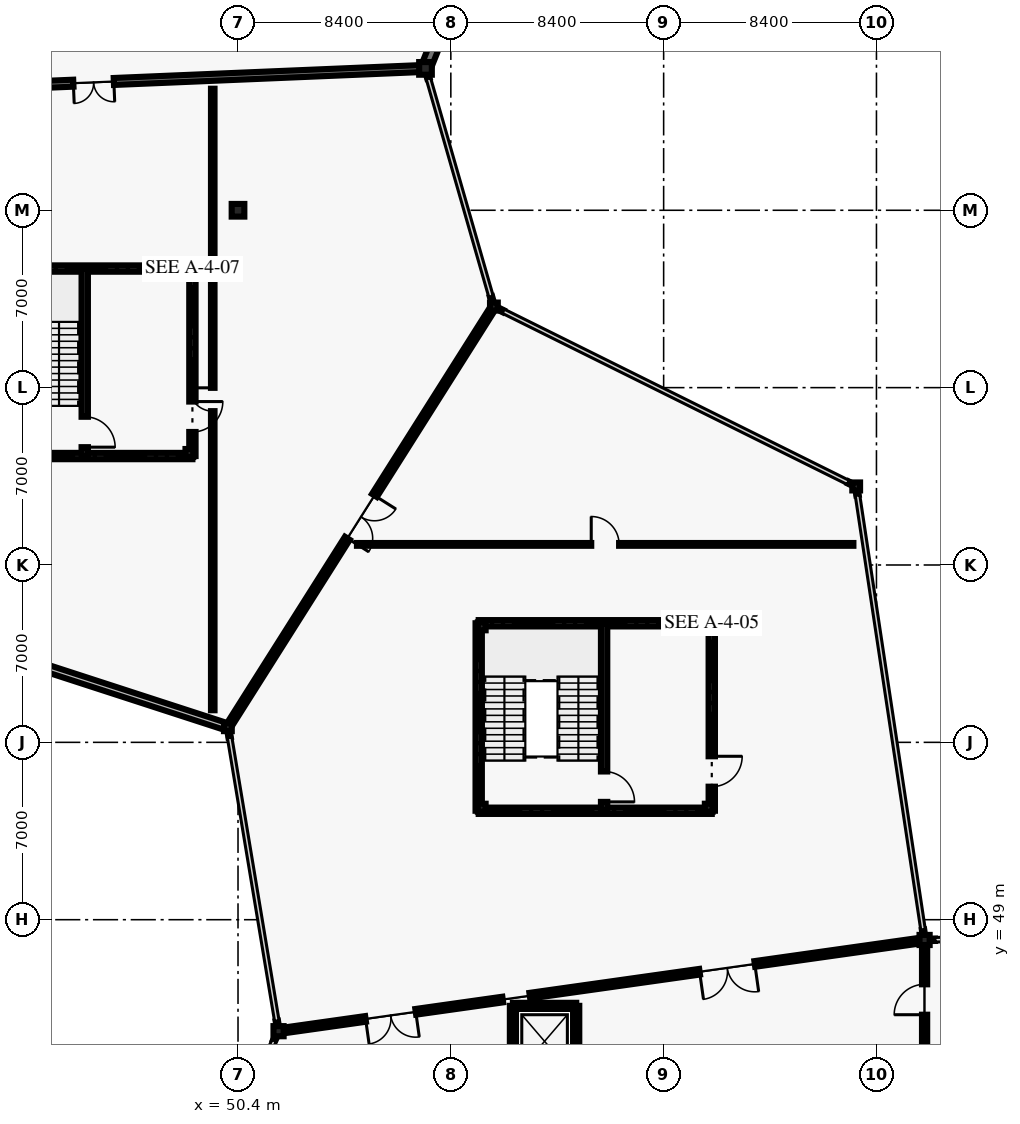
"""IFC4 building model, lengths in metres.
Left out: names, types, materials, properties, quantities, classifications, styles, units other than length and angle.
Written with IfcOpenShell. Run it as: python <this file> out.ifc"""

import sys

from ifc_helpers import new_model, si_unit, direction, frame, frame_2d, origin, origin_2d, place, context, subcontext, project, spatial, rectangle, i_section, extrude, element, fill, save


model = new_model("IFC4")
c1 = context("Model", 3, precision=1e-05, world=origin(), true_north=direction((0.0, 1.0)))
c2 = subcontext(c1, "Body", "Model", "MODEL_VIEW")
j1 = project(units=[si_unit("LENGTHUNIT", "METRE"), si_unit("PLANEANGLEUNIT", "RADIAN")], contexts=[c1])
p1 = place(None, origin())
s1 = spatial("IfcSite", under=j1, at=p1, CompositionType="ELEMENT")
p2 = place(p1, origin())
s2 = spatial("IfcBuilding", under=s1, at=p2, CompositionType="ELEMENT")
p3 = place(p2, frame((0.0, 0.0, 5.4)))
s3 = spatial("IfcBuildingStorey", under=s2, at=p3, CompositionType="ELEMENT", Elevation=5.4)
p4 = place(p3, frame((50.0, 56.6, 0.0), z_axis=(0.0, 0.0, 1.0), x_axis=(1.0, 0.0, 0.0)))
e1 = element("IfcColumn", 1, at=p4, inside=s3, PredefinedType="COLUMN", context=c2, shape_type="SweptSolid", body=[
    extrude(i_section(OverallWidth=0.307, OverallDepth=0.315, WebThickness=0.012, FlangeThickness=0.019, FilletRadius=0.017, at=origin_2d()), origin(), (0.0, 0.0, 1.0), 4.8),
])
p5 = place(p3, frame((52.0, 44.6, 0.0), z_axis=(0.0, 0.0, 1.0), x_axis=(1.0, 0.0, 0.0)))
e2 = element("IfcColumn", 2, at=p5, inside=s3, PredefinedType="COLUMN", context=c2, shape_type="SweptSolid", body=[
    extrude(i_section(OverallWidth=0.4, OverallDepth=0.4, WebThickness=0.022, FlangeThickness=0.036, at=origin_2d()), origin(), (0.0, 0.0, 1.0), 4.8),
])
p6 = place(p3, frame((57.8, 82.6, 0.0), z_axis=(0.0, 0.0, 1.0), x_axis=(1.0, 0.0, 0.0)))
e3 = element("IfcColumn", 3, at=p6, inside=s3, PredefinedType="COLUMN", context=c2, shape_type="SweptSolid", body=[
    extrude(rectangle(XDim=0.5, YDim=0.5, at=origin_2d()), origin(), (0.0, 0.0, 1.0), 4.8),
])
for number, where, z_axis, x_axis in (
    (4, (60.5, 73.2, 0.0), (0.0, 0.0, 1.0), (1.0, 0.0, 0.0)),
    (5, (74.8, 66.1, 0.0), (0.0, 0.0, 1.0), (1.0, 0.0, 0.0)),
):
    element("IfcColumn", number, at=place(p3, frame(where, z_axis=z_axis, x_axis=x_axis)), inside=s3, PredefinedType="COLUMN", context=c2, shape_type="SweptSolid", body=[
        extrude(i_section(OverallWidth=0.307, OverallDepth=0.315, WebThickness=0.012, FlangeThickness=0.019, FilletRadius=0.017, at=origin_2d()), origin(), (0.0, 0.0, 1.0), 4.8),
    ])
p7 = place(p3, frame((77.5, 48.2, 0.0), z_axis=(0.0, 0.0, 1.0), x_axis=(1.0, 0.0, 0.0)))
e6 = element("IfcColumn", 6, at=p7, inside=s3, PredefinedType="COLUMN", context=c2, shape_type="SweptSolid", body=[
    extrude(i_section(OverallWidth=0.4, OverallDepth=0.4, WebThickness=0.022, FlangeThickness=0.036, at=origin_2d()), origin(), (0.0, 0.0, 1.0), 4.8),
])
p8 = place(p3, frame((50.4, 77.0, 0.0), z_axis=(0.0, 0.0, 1.0), x_axis=(1.0, 0.0, 0.0)))
e7 = element("IfcColumn", 7, at=p8, inside=s3, PredefinedType="COLUMN", context=c2, shape_type="SweptSolid", body=[
    extrude(rectangle(XDim=0.5, YDim=0.5, at=origin_2d()), origin(), (0.0, 0.0, 1.0), 4.8),
])
for number, where, z_axis, x_axis in (
    (8, (60.02, 53.42, 0.0), (0.0, 0.0, 1.0), (1.0, 0.0, 0.0)),
    (9, (68.98, 53.42, 0.0), (0.0, 0.0, 1.0), (1.0, 0.0, 0.0)),
    (10, (68.98, 60.58, 0.0), (0.0, 0.0, 1.0), (1.0, 0.0, 0.0)),
    (11, (60.02, 60.58, 0.0), (0.0, 0.0, 1.0), (1.0, 0.0, 0.0)),
    (12, (48.48, 67.42, 0.0), (0.0, 0.0, 1.0), (1.0, 0.0, 0.0)),
    (13, (48.48, 74.58, 0.0), (0.0, 0.0, 1.0), (1.0, 0.0, 0.0)),
):
    element("IfcColumn", number, at=place(p3, frame(where, z_axis=z_axis, x_axis=x_axis)), inside=s3, PredefinedType="COLUMN", context=c2, shape_type="SweptSolid", body=[
        extrude(i_section(OverallWidth=0.307, OverallDepth=0.315, WebThickness=0.012, FlangeThickness=0.019, FilletRadius=0.017, at=origin_2d()), origin(), (0.0, 0.0, 1.0), 4.8),
    ])
p9 = place(p3, frame((51.825, 44.229, 0.0), z_axis=(0.0, 0.0, 1.0), x_axis=(0.425224932958, 0.905087706463, 0.0)))
e14 = element("IfcWall", 14, at=p9, inside=s3, PredefinedType="SOLIDWALL", context=c2, shape_type="SweptSolid", body=[
    extrude(rectangle(XDim=0.308, YDim=0.095, at=frame_2d((0.154, 0.0))), origin(), (0.0, 0.0, 1.0), 3.62),
])
p10 = place(p3, frame((77.602, 48.202, 0.0), z_axis=(0.0, 0.0, 1.0), x_axis=(0.999735659566, 0.022991541735, 0.0)))
e15 = element("IfcWall", 15, at=p10, inside=s3, PredefinedType="SOLIDWALL", context=c2, shape_type="SweptSolid", body=[
    extrude(rectangle(XDim=0.308, YDim=0.095, at=frame_2d((0.154, 0.0))), origin(), (0.0, 0.0, 1.0), 3.62),
])
for number, where, z_axis, x_axis in (
    (16, (51.983, 44.7, 0.0), (0.0, 0.0, 1.0), (-0.166, 0.986, 0.0)),
    (17, (50.068, 56.196, 0.0), (0.0, 0.0, 1.0), (-0.166, 0.986, 0.0)),
):
    element("IfcWall", number, at=place(p3, frame(where, z_axis=z_axis, x_axis=x_axis)), inside=s3, PredefinedType="SOLIDWALL", context=c2, shape_type="SweptSolid", body=[
        extrude(rectangle(XDim=0.308, YDim=0.095, at=frame_2d((0.154, 0.0))), origin(), (0.0, 0.0, 1.0), 3.62),
    ])
p11 = place(p3, frame((74.806, 66.058, 0.0), z_axis=(0.0, 0.0, 1.0), x_axis=(0.14996991646, -0.988690560366, 0.0)))
e18 = element("IfcWall", 18, at=p11, inside=s3, PredefinedType="SOLIDWALL", context=c2, shape_type="SweptSolid", body=[
    extrude(rectangle(XDim=0.308, YDim=0.095, at=frame_2d((0.154, 0.0))), origin(), (0.0, 0.0, 1.0), 3.62),
])
p12 = place(p3, frame((77.439, 48.605, 0.0), z_axis=(0.0, 0.0, 1.0), x_axis=(0.15008766182, -0.988672692942, 0.0)))
e19 = element("IfcWall", 19, at=p12, inside=s3, PredefinedType="SOLIDWALL", context=c2, shape_type="SweptSolid", body=[
    extrude(rectangle(XDim=0.307, YDim=0.095, at=frame_2d((0.154, 0.0))), origin(), (0.0, 0.0, 1.0), 3.62),
])
for number, where, z_axis, x_axis in (
    (20, (60.592, 73.154, 0.0), (0.0, 0.0, 1.0), (0.895, -0.446, 0.0)),
    (21, (74.487, 66.256, 0.0), (0.0, 0.0, 1.0), (0.895, -0.447, 0.0)),
):
    element("IfcWall", number, at=place(p3, frame(where, z_axis=z_axis, x_axis=x_axis)), inside=s3, PredefinedType="SOLIDWALL", context=c2, shape_type="SweptSolid", body=[
        extrude(rectangle(XDim=0.307, YDim=0.095, at=frame_2d((0.154, 0.0))), origin(), (0.0, 0.0, 1.0), 3.62),
    ])
for number, where, z_axis, x_axis in (
    (22, (57.829, 82.502, 0.0), (0.0, 0.0, 1.0), (0.276, -0.961, 0.0)),
    (23, (60.386, 73.594, 0.0), (0.0, 0.0, 1.0), (0.276, -0.961, 0.0)),
):
    element("IfcWall", number, at=place(p3, frame(where, z_axis=z_axis, x_axis=x_axis)), inside=s3, PredefinedType="SOLIDWALL", context=c2, shape_type="SweptSolid", body=[
        extrude(rectangle(XDim=0.308, YDim=0.095, at=frame_2d((0.154, 0.0))), origin(), (0.0, 0.0, 1.0), 3.62),
    ])
p13 = place(p3, frame((49.943, 56.619, 0.0), z_axis=(0.0, 0.0, 1.0), x_axis=(-0.951074357174, 0.308962080402, 0.0)))
e24 = element("IfcWall", 24, at=p13, inside=s3, PredefinedType="SOLIDWALL", context=c2, shape_type="SweptSolid", body=[
    extrude(rectangle(XDim=24.8, YDim=0.29, at=frame_2d((12.4, 0.0))), origin(), (0.0, 0.0, 1.0), 3.62),
])
p14 = place(p13, frame((11.3, 0.0, 0.95)))
e25 = element("IfcOpeningElement", 25, at=p14, cuts=e24, PredefinedType="OPENING", context=c2, shape_type="SweptSolid", body=[
    extrude(rectangle(XDim=2.2, YDim=2.1, at=frame_2d((1.1, 1.05))), frame((0.0, 0.155, 0.0), z_axis=(0.0, -1.0, 0.0), x_axis=(1.0, 0.0, 0.0)), (0.0, 0.0, 1.0), 0.31),
])
p15 = place(p3, frame((62.4, 94.1, 0.0), z_axis=(0.0, 0.0, 1.0), x_axis=(-0.371407751599, -0.928469860605, 0.0)))
e26 = element("IfcWall", 26, at=p15, inside=s3, PredefinedType="SOLIDWALL", context=c2, shape_type="SweptSolid", body=[
    extrude(rectangle(XDim=12.326, YDim=0.4, at=frame_2d((6.163, 0.0))), origin(), (0.0, 0.0, 1.0), 3.62),
])
p16 = place(p3, frame((77.5, 43.5, 0.0), z_axis=(0.0, 0.0, 1.0), x_axis=(0.0, 1.0, 0.0)))
e27 = element("IfcWall", 27, at=p16, inside=s3, PredefinedType="SOLIDWALL", context=c2, shape_type="SweptSolid", body=[
    extrude(rectangle(XDim=4.7, YDim=0.205, at=frame_2d((2.35, 0.0))), origin(), (0.0, 0.0, 1.0), 3.32),
])
p17 = place(p16, frame((1.75, 0.0, 0.0)))
e28 = element("IfcOpeningElement", 28, at=p17, cuts=e27, PredefinedType="OPENING", context=c2, shape_type="SweptSolid", body=[
    extrude(rectangle(XDim=1.2, YDim=2.2, at=frame_2d((0.6, 1.1))), frame((0.0, 0.113, 0.0), z_axis=(0.0, -1.0, 0.0), x_axis=(1.0, 0.0, 0.0)), (0.0, 0.0, 1.0), 0.225),
])
p18 = place(p3, frame((77.5, 48.2, 0.0), z_axis=(0.0, 0.0, 1.0), x_axis=(-0.990181159322, -0.139790098807, 0.0)))
e29 = element("IfcWall", 29, at=p18, inside=s3, PredefinedType="SOLIDWALL", context=c2, shape_type="SweptSolid", body=[
    extrude(rectangle(XDim=15.738, YDim=0.225, at=frame_2d((7.869, 0.0))), origin(), (0.0, 0.0, 1.0), 4.02),
])
p19 = place(p18, frame((6.769, 0.0, 0.0)))
e30 = element("IfcOpeningElement", 30, at=p19, cuts=e29, PredefinedType="OPENING", context=c2, shape_type="SweptSolid", body=[
    extrude(rectangle(XDim=2.2, YDim=2.6, at=frame_2d((1.1, 1.3))), frame((0.0, 0.123, 0.0), z_axis=(0.0, -1.0, 0.0), x_axis=(1.0, 0.0, 0.0)), (0.0, 0.0, 1.0), 0.245),
])
p20 = place(p3, frame((60.85, 45.849, 0.0), z_axis=(0.0, 0.0, 1.0), x_axis=(-0.990187360524, -0.139746166523, 0.0)))
e31 = element("IfcWall", 31, at=p20, inside=s3, PredefinedType="SOLIDWALL", context=c2, shape_type="SweptSolid", body=[
    extrude(rectangle(XDim=8.938, YDim=0.225, at=frame_2d((4.469, 0.0))), origin(), (0.0, 0.0, 1.0), 4.02),
])
p21 = place(p20, frame((3.469, 0.0, 0.0)))
e32 = element("IfcOpeningElement", 32, at=p21, cuts=e31, PredefinedType="OPENING", context=c2, shape_type="SweptSolid", body=[
    extrude(rectangle(XDim=2.0, YDim=2.5, at=frame_2d((1.0, 1.25))), frame((0.0, 0.123, 0.0), z_axis=(0.0, -1.0, 0.0), x_axis=(1.0, 0.0, 0.0)), (0.0, 0.0, 1.0), 0.245),
])
p22 = place(p3, frame((60.5, 73.2, 0.0), z_axis=(0.0, 0.0, 1.0), x_axis=(-0.534570878454, -0.845123645338, 0.0)))
e33 = element("IfcWall", 33, at=p22, inside=s3, PredefinedType="SOLIDWALL", context=c2, shape_type="SweptSolid", body=[
    extrude(rectangle(XDim=19.642, YDim=0.225, at=frame_2d((9.821, 0.0))), origin(), (0.0, 0.0, 1.0), 4.02),
])
p23 = place(p22, frame((8.821, 0.0, 0.0)))
e34 = element("IfcOpeningElement", 34, at=p23, cuts=e33, PredefinedType="OPENING", context=c2, shape_type="SweptSolid", body=[
    extrude(rectangle(XDim=2.0, YDim=2.5, at=frame_2d((1.0, 1.25))), frame((0.0, 0.123, 0.0), z_axis=(0.0, -1.0, 0.0), x_axis=(1.0, 0.0, 0.0)), (0.0, 0.0, 1.0), 0.245),
])
p24 = place(p3, frame((57.8, 82.6, 0.0), z_axis=(0.0, 0.0, 1.0), x_axis=(-0.999119645224, -0.041951573605, 0.0)))
e35 = element("IfcWall", 35, at=p24, inside=s3, PredefinedType="SOLIDWALL", context=c2, shape_type="SweptSolid", body=[
    extrude(rectangle(XDim=26.223, YDim=0.275, at=frame_2d((13.112, 0.0))), origin(), (0.0, 0.0, 1.0), 4.02),
])
p25 = place(p24, frame((12.312, 0.0, 0.0)))
e36 = element("IfcOpeningElement", 36, at=p25, cuts=e35, PredefinedType="OPENING", context=c2, shape_type="SweptSolid", body=[
    extrude(rectangle(XDim=1.6, YDim=2.45, at=frame_2d((0.8, 1.225))), frame((0.0, 0.147, 0.0), z_axis=(0.0, -1.0, 0.0), x_axis=(1.0, 0.0, 0.0)), (0.0, 0.0, 1.0), 0.295),
])
p26 = place(p3, frame((55.095, 63.813, 0.0), z_axis=(0.0, 0.0, 1.0), x_axis=(1.0, 0.0, 0.0)))
e37 = element("IfcWall", 37, at=p26, inside=s3, PredefinedType="PARTITIONING", context=c2, shape_type="SweptSolid", body=[
    extrude(rectangle(XDim=19.595, YDim=0.11, at=frame_2d((9.797, 0.0))), origin(), (0.0, 0.0, 1.0), 3.32),
])
p27 = place(p26, frame((9.247, 0.0, 0.0)))
e38 = element("IfcOpeningElement", 38, at=p27, cuts=e37, PredefinedType="OPENING", context=c2, shape_type="SweptSolid", body=[
    extrude(rectangle(XDim=1.1, YDim=2.2, at=frame_2d((0.55, 1.1))), frame((0.0, 0.065, 0.0), z_axis=(0.0, -1.0, 0.0), x_axis=(1.0, 0.0, 0.0)), (0.0, 0.0, 1.0), 0.13),
])
p28 = place(p3, frame((49.403, 57.267, 0.0), z_axis=(0.0, 0.0, 1.0), x_axis=(0.0, 1.0, 0.0)))
e39 = element("IfcWall", 39, at=p28, inside=s3, PredefinedType="PARTITIONING", context=c2, shape_type="SweptSolid", body=[
    extrude(rectangle(XDim=24.53, YDim=0.14, at=frame_2d((12.265, 0.0))), origin(), (0.0, 0.0, 1.0), 3.32),
])
p29 = place(p28, frame((11.805, 0.0, 0.0)))
e40 = element("IfcOpeningElement", 40, at=p29, cuts=e39, PredefinedType="OPENING", context=c2, shape_type="SweptSolid", body=[
    extrude(rectangle(XDim=0.92, YDim=2.1, at=frame_2d((0.46, 1.05))), frame((0.0, 0.08, 0.0), z_axis=(0.0, -1.0, 0.0), x_axis=(1.0, 0.0, 0.0)), (0.0, 0.0, 1.0), 0.16),
])
p30 = place(p3, frame((59.9, 53.3, 0.0), z_axis=(0.0, 0.0, 1.0), x_axis=(0.0, 1.0, 0.0)))
e41 = element("IfcWall", 41, at=p30, inside=s3, PredefinedType="SHEAR", context=c2, shape_type="SweptSolid", body=[
    extrude(rectangle(XDim=7.4, YDim=0.25, at=frame_2d((3.7, 0.0))), origin(), (0.0, 0.0, 1.0), 4.56),
])
for number, where, z_axis, x_axis in (
    (42, (59.9, 60.7, 0.0), (0.0, 0.0, 1.0), (1.0, 0.0, 0.0)),
    (43, (69.1, 53.3, 0.0), (0.0, 0.0, 1.0), (-1.0, 0.0, 0.0)),
):
    element("IfcWall", number, at=place(p3, frame(where, z_axis=z_axis, x_axis=x_axis)), inside=s3, PredefinedType="SHEAR", context=c2, shape_type="SweptSolid", body=[
        extrude(rectangle(XDim=9.2, YDim=0.25, at=frame_2d((4.6, 0.0))), origin(), (0.0, 0.0, 1.0), 4.56),
    ])
p31 = place(p3, frame((69.1, 60.7, 0.0), z_axis=(0.0, 0.0, 1.0), x_axis=(0.0, -1.0, 0.0)))
e44 = element("IfcWall", 44, at=p31, inside=s3, PredefinedType="SHEAR", context=c2, shape_type="SweptSolid", body=[
    extrude(rectangle(XDim=7.4, YDim=0.25, at=frame_2d((3.7, 0.0))), origin(), (0.0, 0.0, 1.0), 4.56),
])
p32 = place(p31, frame((5.25, 0.0, 0.0)))
e45 = element("IfcOpeningElement", 45, at=p32, cuts=e44, PredefinedType="OPENING", context=c2, shape_type="SweptSolid", body=[
    extrude(rectangle(XDim=1.2, YDim=2.2, at=frame_2d((0.6, 1.1))), frame((0.0, 0.135, 0.0), z_axis=(0.0, -1.0, 0.0), x_axis=(1.0, 0.0, 0.0)), (0.0, 0.0, 1.0), 0.27),
])
p33 = place(p3, frame((64.85, 60.7, 0.0), z_axis=(0.0, 0.0, 1.0), x_axis=(0.0, -1.0, 0.0)))
e46 = element("IfcWall", 46, at=p33, inside=s3, PredefinedType="SHEAR", context=c2, shape_type="SweptSolid", body=[
    extrude(rectangle(XDim=7.4, YDim=0.25, at=frame_2d((3.7, 0.0))), origin(), (0.0, 0.0, 1.0), 4.56),
])
p34 = place(p33, frame((5.85, 0.0, 0.0)))
e47 = element("IfcOpeningElement", 47, at=p34, cuts=e46, PredefinedType="OPENING", context=c2, shape_type="SweptSolid", body=[
    extrude(rectangle(XDim=1.2, YDim=2.2, at=frame_2d((0.6, 1.1))), frame((0.0, 0.135, 0.0), z_axis=(0.0, -1.0, 0.0), x_axis=(1.0, 0.0, 0.0)), (0.0, 0.0, 1.0), 0.27),
])
for number, where, z_axis, x_axis in (
    (48, (39.4, 74.7, 0.0), (0.0, 0.0, 1.0), (1.0, 0.0, 0.0)),
    (49, (48.6, 67.3, 0.0), (0.0, 0.0, 1.0), (-1.0, 0.0, 0.0)),
):
    element("IfcWall", number, at=place(p3, frame(where, z_axis=z_axis, x_axis=x_axis)), inside=s3, PredefinedType="SHEAR", context=c2, shape_type="SweptSolid", body=[
        extrude(rectangle(XDim=9.2, YDim=0.25, at=frame_2d((4.6, 0.0))), origin(), (0.0, 0.0, 1.0), 4.56),
    ])
p35 = place(p3, frame((48.6, 74.7, 0.0), z_axis=(0.0, 0.0, 1.0), x_axis=(0.0, -1.0, 0.0)))
e50 = element("IfcWall", 50, at=p35, inside=s3, PredefinedType="SHEAR", context=c2, shape_type="SweptSolid", body=[
    extrude(rectangle(XDim=7.4, YDim=0.25, at=frame_2d((3.7, 0.0))), origin(), (0.0, 0.0, 1.0), 4.56),
])
p36 = place(p35, frame((5.25, 0.0, 0.0)))
e51 = element("IfcOpeningElement", 51, at=p36, cuts=e50, PredefinedType="OPENING", context=c2, shape_type="SweptSolid", body=[
    extrude(rectangle(XDim=1.2, YDim=2.2, at=frame_2d((0.6, 1.1))), frame((0.0, 0.135, 0.0), z_axis=(0.0, -1.0, 0.0), x_axis=(1.0, 0.0, 0.0)), (0.0, 0.0, 1.0), 0.27),
])
p37 = place(p3, frame((44.35, 74.7, 0.0), z_axis=(0.0, 0.0, 1.0), x_axis=(0.0, -1.0, 0.0)))
e52 = element("IfcWall", 52, at=p37, inside=s3, PredefinedType="SHEAR", context=c2, shape_type="SweptSolid", body=[
    extrude(rectangle(XDim=7.4, YDim=0.25, at=frame_2d((3.7, 0.0))), origin(), (0.0, 0.0, 1.0), 4.56),
])
p38 = place(p37, frame((5.85, 0.0, 0.0)))
e53 = element("IfcOpeningElement", 53, at=p38, cuts=e52, PredefinedType="OPENING", context=c2, shape_type="SweptSolid", body=[
    extrude(rectangle(XDim=1.2, YDim=2.2, at=frame_2d((0.6, 1.1))), frame((0.0, 0.135, 0.0), z_axis=(0.0, -1.0, 0.0), x_axis=(1.0, 0.0, 0.0)), (0.0, 0.0, 1.0), 0.27),
])
p39 = place(p3, frame((61.25, 45.6, 0.0), z_axis=(0.0, 0.0, 1.0), x_axis=(1.0, 0.0, 0.0)))
e54 = element("IfcWall", 54, at=p39, inside=s3, PredefinedType="SHEAR", context=c2, shape_type="SweptSolid", body=[
    extrude(rectangle(XDim=2.5, YDim=0.24, at=frame_2d((1.25, 0.0))), origin(), (0.0, 0.0, 1.0), 4.56),
])
for number, where, z_axis, x_axis in (
    (55, (63.75, 45.6, 0.0), (0.0, 0.0, 1.0), (0.0, -1.0, 0.0)),
    (56, (61.25, 42.8, 0.0), (0.0, 0.0, 1.0), (0.0, 1.0, 0.0)),
):
    element("IfcWall", number, at=place(p3, frame(where, z_axis=z_axis, x_axis=x_axis)), inside=s3, PredefinedType="SHEAR", context=c2, shape_type="SweptSolid", body=[
        extrude(rectangle(XDim=2.8, YDim=0.24, at=frame_2d((1.4, 0.0))), origin(), (0.0, 0.0, 1.0), 4.56),
    ])
p40 = place(p17, origin())
e57 = element("IfcDoor", 57, at=p40, inside=s3, OperationType="SINGLE_SWING_LEFT", PredefinedType="DOOR", context=c2, shape_type="SweptSolid", body=[
    extrude(rectangle(XDim=1.2, YDim=2.2, at=frame_2d((0.6, 1.1))), frame((0.0, 0.025, 0.0), z_axis=(0.0, -1.0, 0.0), x_axis=(1.0, 0.0, 0.0)), (0.0, 0.0, 1.0), 0.05),
])
fill(e28, e57)
p41 = place(p19, origin())
e58 = element("IfcDoor", 58, at=p41, inside=s3, OperationType="DOUBLE_DOOR_SINGLE_SWING", PredefinedType="DOOR", context=c2, shape_type="SweptSolid", body=[
    extrude(rectangle(XDim=2.2, YDim=2.6, at=frame_2d((1.1, 1.3))), frame((0.0, 0.025, 0.0), z_axis=(0.0, -1.0, 0.0), x_axis=(1.0, 0.0, 0.0)), (0.0, 0.0, 1.0), 0.05),
])
fill(e30, e58)
p42 = place(p21, origin())
e59 = element("IfcDoor", 59, at=p42, inside=s3, OperationType="DOUBLE_DOOR_SINGLE_SWING", PredefinedType="DOOR", context=c2, shape_type="SweptSolid", body=[
    extrude(rectangle(XDim=2.0, YDim=2.5, at=frame_2d((1.0, 1.25))), frame((0.0, 0.025, 0.0), z_axis=(0.0, -1.0, 0.0), x_axis=(1.0, 0.0, 0.0)), (0.0, 0.0, 1.0), 0.05),
])
fill(e32, e59)
p43 = place(p23, origin())
e60 = element("IfcDoor", 60, at=p43, inside=s3, OperationType="DOUBLE_DOOR_SINGLE_SWING", PredefinedType="DOOR", context=c2, shape_type="SweptSolid", body=[
    extrude(rectangle(XDim=2.0, YDim=2.5, at=frame_2d((1.0, 1.25))), frame((0.0, 0.025, 0.0), z_axis=(0.0, -1.0, 0.0), x_axis=(1.0, 0.0, 0.0)), (0.0, 0.0, 1.0), 0.05),
])
fill(e34, e60)
p44 = place(p25, origin())
e61 = element("IfcDoor", 61, at=p44, inside=s3, OperationType="DOUBLE_DOOR_SINGLE_SWING", PredefinedType="DOOR", context=c2, shape_type="SweptSolid", body=[
    extrude(rectangle(XDim=1.6, YDim=2.45, at=frame_2d((0.8, 1.225))), frame((0.0, 0.025, 0.0), z_axis=(0.0, -1.0, 0.0), x_axis=(1.0, 0.0, 0.0)), (0.0, 0.0, 1.0), 0.05),
])
fill(e36, e61)
p45 = place(p27, origin())
e62 = element("IfcDoor", 62, at=p45, inside=s3, OperationType="SINGLE_SWING_LEFT", PredefinedType="DOOR", context=c2, shape_type="SweptSolid", body=[
    extrude(rectangle(XDim=1.1, YDim=2.2, at=frame_2d((0.55, 1.1))), frame((0.0, 0.025, 0.0), z_axis=(0.0, -1.0, 0.0), x_axis=(1.0, 0.0, 0.0)), (0.0, 0.0, 1.0), 0.05),
])
fill(e38, e62)
p46 = place(p29, origin())
e63 = element("IfcDoor", 63, at=p46, inside=s3, OperationType="SINGLE_SWING_RIGHT", PredefinedType="DOOR", context=c2, shape_type="SweptSolid", body=[
    extrude(rectangle(XDim=0.92, YDim=2.1, at=frame_2d((0.46, 1.05))), frame((0.0, 0.025, 0.0), z_axis=(0.0, -1.0, 0.0), x_axis=(1.0, 0.0, 0.0)), (0.0, 0.0, 1.0), 0.05),
])
fill(e40, e63)
p47 = place(p32, origin())
e64 = element("IfcDoor", 64, at=p47, inside=s3, OperationType="SINGLE_SWING_LEFT", PredefinedType="DOOR", context=c2, shape_type="SweptSolid", body=[
    extrude(rectangle(XDim=1.2, YDim=2.2, at=frame_2d((0.6, 1.1))), frame((0.0, 0.025, 0.0), z_axis=(0.0, -1.0, 0.0), x_axis=(1.0, 0.0, 0.0)), (0.0, 0.0, 1.0), 0.05),
])
fill(e45, e64)
p48 = place(p34, origin())
e65 = element("IfcDoor", 65, at=p48, inside=s3, OperationType="SINGLE_SWING_RIGHT", PredefinedType="DOOR", context=c2, shape_type="SweptSolid", body=[
    extrude(rectangle(XDim=1.2, YDim=2.2, at=frame_2d((0.6, 1.1))), frame((0.0, 0.025, 0.0), z_axis=(0.0, -1.0, 0.0), x_axis=(1.0, 0.0, 0.0)), (0.0, 0.0, 1.0), 0.05),
])
fill(e47, e65)
p49 = place(p36, origin())
e66 = element("IfcDoor", 66, at=p49, inside=s3, OperationType="SINGLE_SWING_LEFT", PredefinedType="DOOR", context=c2, shape_type="SweptSolid", body=[
    extrude(rectangle(XDim=1.2, YDim=2.2, at=frame_2d((0.6, 1.1))), frame((0.0, 0.025, 0.0), z_axis=(0.0, -1.0, 0.0), x_axis=(1.0, 0.0, 0.0)), (0.0, 0.0, 1.0), 0.05),
])
fill(e51, e66)
p50 = place(p38, origin())
e67 = element("IfcDoor", 67, at=p50, inside=s3, OperationType="SINGLE_SWING_RIGHT", PredefinedType="DOOR", context=c2, shape_type="SweptSolid", body=[
    extrude(rectangle(XDim=1.2, YDim=2.2, at=frame_2d((0.6, 1.1))), frame((0.0, 0.025, 0.0), z_axis=(0.0, -1.0, 0.0), x_axis=(1.0, 0.0, 0.0)), (0.0, 0.0, 1.0), 0.05),
])
fill(e53, e67)
save(model, sys.argv[1])
